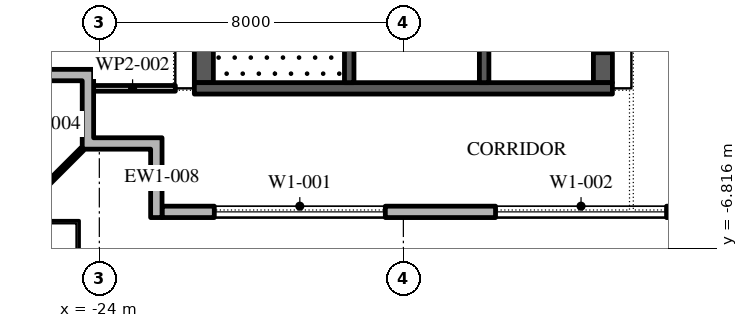
"""IFC4 building model, lengths in metres.
Left out: names, types, materials, properties, quantities, classifications, styles, units other than length and angle.
Written with IfcOpenShell. Run it as: python <this file> out.ifc"""

import sys

from ifc_helpers import new_model, si_unit, direction, frame, frame_2d, origin, place, context, subcontext, project, spatial, polyline, rectangle, outline, extrude, element, fill, save


model = new_model("IFC4")
c1 = context("Model", 3, precision=1e-05, world=origin(), true_north=direction((0.0, 1.0)))
c2 = subcontext(c1, "Body", "Model", "MODEL_VIEW")
j1 = project(units=[si_unit("LENGTHUNIT", "METRE"), si_unit("PLANEANGLEUNIT", "RADIAN")], contexts=[c1])
p1 = place(None, origin())
s1 = spatial("IfcSite", under=j1, at=p1, CompositionType="ELEMENT")
p2 = place(p1, origin())
s2 = spatial("IfcBuilding", under=s1, at=p2, CompositionType="ELEMENT")
p3 = place(p2, frame((0.0, 0.0, 338.4)))
s3 = spatial("IfcBuildingStorey", under=s2, at=p3, CompositionType="ELEMENT", Elevation=338.4)
p4 = place(p3, frame((-22.35, -5.85, 0.0), z_axis=(0.0, 0.0, 1.0), x_axis=(1.0, 0.0, 0.0)))
e1 = element("IfcWall", 1, at=p4, inside=s3, PredefinedType="STANDARD", context=c2, shape_type="SweptSolid", body=[
    extrude(rectangle(XDim=45.0, YDim=0.3, at=frame_2d((22.5, 0.0))), origin(), (0.0, 0.0, 1.0), 4.0),
])
p5 = place(p4, frame((1.375, 0.0, 0.45)))
e2 = element("IfcOpeningElement", 2, at=p5, cuts=e1, PredefinedType="OPENING", context=c2, shape_type="SweptSolid", body=[
    extrude(rectangle(XDim=4.5, YDim=3.05, at=frame_2d((2.25, 1.525))), frame((0.0, 0.16, 0.0), z_axis=(0.0, -1.0, 0.0), x_axis=(1.0, 0.0, 0.0)), (0.0, 0.0, 1.0), 0.32),
])
p6 = place(p4, frame((8.775, 0.0, 0.45)))
e3 = element("IfcOpeningElement", 3, at=p6, cuts=e1, PredefinedType="OPENING", context=c2, shape_type="SweptSolid", body=[
    extrude(rectangle(XDim=4.5, YDim=3.05, at=frame_2d((2.25, 1.525))), frame((0.0, 0.16, 0.0), z_axis=(0.0, -1.0, 0.0), x_axis=(1.0, 0.0, 0.0)), (0.0, 0.0, 1.0), 0.32),
])
p7 = place(p4, frame((17.375, 0.0, 0.0)))
e4 = element("IfcOpeningElement", 4, at=p7, cuts=e1, PredefinedType="OPENING", context=c2, shape_type="SweptSolid", body=[
    extrude(rectangle(XDim=2.4, YDim=3.5, at=frame_2d((1.2, 1.75))), frame((0.0, 0.16, 0.0), z_axis=(0.0, -1.0, 0.0), x_axis=(1.0, 0.0, 0.0)), (0.0, 0.0, 1.0), 0.32),
])
p8 = place(p4, frame((23.875, 0.0, 0.45)))
e5 = element("IfcOpeningElement", 5, at=p8, cuts=e1, PredefinedType="OPENING", context=c2, shape_type="SweptSolid", body=[
    extrude(rectangle(XDim=4.5, YDim=3.05, at=frame_2d((2.25, 1.525))), frame((0.0, 0.16, 0.0), z_axis=(0.0, -1.0, 0.0), x_axis=(1.0, 0.0, 0.0)), (0.0, 0.0, 1.0), 0.32),
])
p9 = place(p4, frame((31.425, 0.0, 0.45)))
e6 = element("IfcOpeningElement", 6, at=p9, cuts=e1, PredefinedType="OPENING", context=c2, shape_type="SweptSolid", body=[
    extrude(rectangle(XDim=4.5, YDim=3.05, at=frame_2d((2.25, 1.525))), frame((0.0, 0.16, 0.0), z_axis=(0.0, -1.0, 0.0), x_axis=(1.0, 0.0, 0.0)), (0.0, 0.0, 1.0), 0.32),
])
p10 = place(p4, frame((38.975, 0.0, 0.45)))
e7 = element("IfcOpeningElement", 7, at=p10, cuts=e1, PredefinedType="OPENING", context=c2, shape_type="SweptSolid", body=[
    extrude(rectangle(XDim=4.5, YDim=3.05, at=frame_2d((2.25, 1.525))), frame((0.0, 0.16, 0.0), z_axis=(0.0, -1.0, 0.0), x_axis=(1.0, 0.0, 0.0)), (0.0, 0.0, 1.0), 0.32),
])
p11 = place(p3, origin())
e8 = element("IfcWall", 8, at=p11, inside=s3, PredefinedType="STANDARD", context=c2, shape_type="SweptSolid", body=[
    extrude(outline(polyline([(-22.65, -4.2), (-24.45, -4.2), (-24.45, -2.4), (-25.95, -2.4), (-25.95, -2.1), (-24.15, -2.1), (-24.15, -3.9), (-22.35, -3.9), (-22.35, -6.0), (-22.65, -6.0), (-22.65, -4.2)])), origin(), (0.0, 0.0, 1.0), 4.0),
])
p12 = place(p3, frame((-24.45, -4.2, -0.05), z_axis=(0.0, 0.0, 1.0), x_axis=(-0.707106781187, -0.707106781187, 0.0)))
e9 = element("IfcWall", 9, at=p12, inside=s3, PredefinedType="STANDARD", context=c2, shape_type="SweptSolid", body=[
    extrude(rectangle(XDim=2.667, YDim=0.1, at=frame_2d((1.333, 0.0))), origin(), (0.0, 0.0, 1.0), 4.05),
])
p13 = place(p3, frame((-21.25, -2.45, 0.0), z_axis=(0.0, 0.0, 1.0), x_axis=(0.0, 1.0, 0.0)))
e10 = element("IfcWall", 10, at=p13, inside=s3, PredefinedType="SHEAR", context=c2, shape_type="SweptSolid", body=[
    extrude(rectangle(XDim=27.9, YDim=0.5, at=frame_2d((13.95, 0.0))), origin(), (0.0, 0.0, 1.0), 4.0),
])
p14 = place(p13, frame((5.05, 0.0, 0.0)))
e11 = element("IfcOpeningElement", 11, at=p14, cuts=e10, PredefinedType="OPENING", context=c2, shape_type="SweptSolid", body=[
    extrude(rectangle(XDim=1.2, YDim=2.1, at=frame_2d((0.6, 1.05))), frame((0.0, 0.26, 0.0), z_axis=(0.0, -1.0, 0.0), x_axis=(1.0, 0.0, 0.0)), (0.0, 0.0, 1.0), 0.52),
])
p15 = place(p13, frame((21.65, 0.0, 0.0)))
e12 = element("IfcOpeningElement", 12, at=p15, cuts=e10, PredefinedType="OPENING", context=c2, shape_type="SweptSolid", body=[
    extrude(rectangle(XDim=1.2, YDim=2.1, at=frame_2d((0.6, 1.05))), frame((0.0, 0.26, 0.0), z_axis=(0.0, -1.0, 0.0), x_axis=(1.0, 0.0, 0.0)), (0.0, 0.0, 1.0), 0.52),
])
p16 = place(p3, frame((-10.75, -2.45, 0.0), z_axis=(0.0, 0.0, 1.0), x_axis=(0.0, 1.0, 0.0)))
e13 = element("IfcWall", 13, at=p16, inside=s3, PredefinedType="SHEAR", context=c2, shape_type="SweptSolid", body=[
    extrude(rectangle(XDim=27.9, YDim=0.5, at=frame_2d((13.95, 0.0))), origin(), (0.0, 0.0, 1.0), 4.0),
])
p17 = place(p16, frame((23.65, 0.0, 0.0)))
e14 = element("IfcOpeningElement", 14, at=p17, cuts=e13, PredefinedType="OPENING", context=c2, shape_type="SweptSolid", body=[
    extrude(rectangle(XDim=2.4, YDim=2.1, at=frame_2d((1.2, 1.05))), frame((0.0, 0.26, 0.0), z_axis=(0.0, -1.0, 0.0), x_axis=(1.0, 0.0, 0.0)), (0.0, 0.0, 1.0), 0.52),
])
p18 = place(p16, frame((0.788, 0.0, 0.0)))
e15 = element("IfcOpeningElement", 15, at=p18, cuts=e13, PredefinedType="OPENING", context=c2, shape_type="SweptSolid", body=[
    extrude(rectangle(XDim=0.9, YDim=2.1, at=frame_2d((0.45, 1.05))), frame((0.0, 0.26, 0.0), z_axis=(0.0, -1.0, 0.0), x_axis=(1.0, 0.0, 0.0)), (0.0, 0.0, 1.0), 0.52),
])
p19 = place(p16, frame((3.962, 0.0, 0.0)))
e16 = element("IfcOpeningElement", 16, at=p19, cuts=e13, PredefinedType="OPENING", context=c2, shape_type="SweptSolid", body=[
    extrude(rectangle(XDim=1.0, YDim=2.1, at=frame_2d((0.5, 1.05))), frame((0.0, 0.26, 0.0), z_axis=(0.0, -1.0, 0.0), x_axis=(1.0, 0.0, 0.0)), (0.0, 0.0, 1.0), 0.52),
])
p20 = place(p3, frame((-21.5, -2.6, 0.0), z_axis=(0.0, 0.0, 1.0), x_axis=(1.0, 0.0, 0.0)))
e17 = element("IfcWall", 17, at=p20, inside=s3, PredefinedType="SHEAR", context=c2, shape_type="SweptSolid", body=[
    extrude(rectangle(XDim=11.0, YDim=0.3, at=frame_2d((5.5, 0.0))), origin(), (0.0, 0.0, 1.0), 4.0),
])
p21 = place(p3, frame((-17.425, -2.45, 0.0), z_axis=(0.0, 0.0, 1.0), x_axis=(0.0, 1.0, 0.0)))
e18 = element("IfcWall", 18, at=p21, inside=s3, PredefinedType="SHEAR", context=c2, shape_type="SweptSolid", body=[
    extrude(rectangle(XDim=6.3, YDim=0.25, at=frame_2d((3.15, 0.0))), origin(), (0.0, 0.0, 1.0), 4.0),
])
p22 = place(p21, frame((5.05, 0.0, 0.0)))
e19 = element("IfcOpeningElement", 19, at=p22, cuts=e18, PredefinedType="OPENING", context=c2, shape_type="SweptSolid", body=[
    extrude(rectangle(XDim=1.2, YDim=2.1, at=frame_2d((0.6, 1.05))), frame((0.0, 0.135, 0.0), z_axis=(0.0, -1.0, 0.0), x_axis=(1.0, 0.0, 0.0)), (0.0, 0.0, 1.0), 0.27),
])
p23 = place(p3, frame((-13.875, -2.45, 0.0), z_axis=(0.0, 0.0, 1.0), x_axis=(0.0, 1.0, 0.0)))
e20 = element("IfcWall", 20, at=p23, inside=s3, PredefinedType="SHEAR", context=c2, shape_type="SweptSolid", body=[
    extrude(rectangle(XDim=21.3, YDim=0.25, at=frame_2d((10.65, 0.0))), origin(), (0.0, 0.0, 1.0), 4.0),
])
p24 = place(p23, frame((11.357, 0.0, 0.0)))
e21 = element("IfcOpeningElement", 21, at=p24, cuts=e20, PredefinedType="OPENING", context=c2, shape_type="SweptSolid", body=[
    extrude(rectangle(XDim=0.9, YDim=2.1, at=frame_2d((0.45, 1.05))), frame((0.0, 0.135, 0.0), z_axis=(0.0, -1.0, 0.0), x_axis=(1.0, 0.0, 0.0)), (0.0, 0.0, 1.0), 0.27),
])
p25 = place(p23, frame((6.971, 0.0, 0.0)))
e22 = element("IfcOpeningElement", 22, at=p25, cuts=e20, PredefinedType="OPENING", context=c2, shape_type="SweptSolid", body=[
    extrude(rectangle(XDim=1.1, YDim=2.1, at=frame_2d((0.55, 1.05))), frame((0.0, 0.135, 0.0), z_axis=(0.0, -1.0, 0.0), x_axis=(1.0, 0.0, 0.0)), (0.0, 0.0, 1.0), 0.27),
])
p26 = place(p23, frame((15.543, 0.0, 0.0)))
e23 = element("IfcOpeningElement", 23, at=p26, cuts=e20, PredefinedType="OPENING", context=c2, shape_type="SweptSolid", body=[
    extrude(rectangle(XDim=1.1, YDim=2.1, at=frame_2d((0.55, 1.05))), frame((0.0, 0.135, 0.0), z_axis=(0.0, -1.0, 0.0), x_axis=(1.0, 0.0, 0.0)), (0.0, 0.0, 1.0), 0.27),
])
p27 = place(p23, frame((17.686, 0.0, 0.0)))
e24 = element("IfcOpeningElement", 24, at=p27, cuts=e20, PredefinedType="OPENING", context=c2, shape_type="SweptSolid", body=[
    extrude(rectangle(XDim=1.1, YDim=2.1, at=frame_2d((0.55, 1.05))), frame((0.0, 0.135, 0.0), z_axis=(0.0, -1.0, 0.0), x_axis=(1.0, 0.0, 0.0)), (0.0, 0.0, 1.0), 0.27),
])
p28 = place(p23, frame((19.829, 0.0, 0.0)))
e25 = element("IfcOpeningElement", 25, at=p28, cuts=e20, PredefinedType="OPENING", context=c2, shape_type="SweptSolid", body=[
    extrude(rectangle(XDim=1.1, YDim=2.1, at=frame_2d((0.55, 1.05))), frame((0.0, 0.135, 0.0), z_axis=(0.0, -1.0, 0.0), x_axis=(1.0, 0.0, 0.0)), (0.0, 0.0, 1.0), 0.27),
])
p29 = place(p3, frame((-24.25, -2.6, 0.0), z_axis=(0.0, 0.0, 1.0), x_axis=(1.0, 0.0, 0.0)))
e26 = element("IfcWall", 26, at=p29, inside=s3, PredefinedType="PARTITIONING", context=c2, shape_type="SweptSolid", body=[
    extrude(rectangle(XDim=2.25, YDim=0.15, at=frame_2d((1.125, 0.0))), origin(), (0.0, 0.0, 1.0), 4.0),
])
p30 = place(p5, origin())
e27 = element("IfcWindow", 27, at=p30, inside=s3, PartitioningType="DOUBLE_PANEL_VERTICAL", PredefinedType="WINDOW", context=c2, shape_type="SweptSolid", body=[
    extrude(rectangle(XDim=4.5, YDim=3.05, at=frame_2d((2.25, 1.525))), frame((0.0, 0.03, 0.0), z_axis=(0.0, -1.0, 0.0), x_axis=(1.0, 0.0, 0.0)), (0.0, 0.0, 1.0), 0.06),
])
fill(e2, e27)
p31 = place(p6, origin())
e28 = element("IfcWindow", 28, at=p31, inside=s3, PartitioningType="DOUBLE_PANEL_VERTICAL", PredefinedType="WINDOW", context=c2, shape_type="SweptSolid", body=[
    extrude(rectangle(XDim=4.5, YDim=3.05, at=frame_2d((2.25, 1.525))), frame((0.0, 0.03, 0.0), z_axis=(0.0, -1.0, 0.0), x_axis=(1.0, 0.0, 0.0)), (0.0, 0.0, 1.0), 0.06),
])
fill(e3, e28)
p32 = place(p18, frame((0.9, 0.45, 0.0), z_axis=(0.0, 0.0, 1.0), x_axis=(-1.0, 0.0, 0.0)))
e29 = element("IfcDoor", 29, at=p32, inside=s3, OperationType="SINGLE_SWING_RIGHT", PredefinedType="DOOR", context=c2, shape_type="SweptSolid", body=[
    extrude(rectangle(XDim=0.9, YDim=2.1, at=frame_2d((0.45, 1.05))), frame((0.0, 0.25, 0.0), z_axis=(0.0, -1.0, 0.0), x_axis=(1.0, 0.0, 0.0)), (0.0, 0.0, 1.0), 0.05),
])
fill(e15, e29)
save(model, sys.argv[1])
